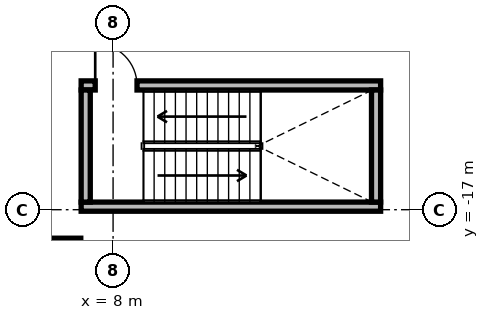
"""IFC4 building model, lengths in metres.
Left out: names, types, materials, properties, quantities, classifications, styles, units other than length and angle.
Written with IfcOpenShell. Run it as: python <this file> out.ifc"""

import sys

from ifc_helpers import new_model, si_unit, direction, frame, frame_2d, origin, origin_2d, place, context, subcontext, project, spatial, rectangle, extrude, source, transform, mapped, element, fill, save


model = new_model("IFC4")
c1 = context("Model", 3, precision=1e-05, world=origin(), true_north=direction((0.0, 1.0)))
c2 = subcontext(c1, "Body", "Model", "MODEL_VIEW")
j1 = project(units=[si_unit("LENGTHUNIT", "METRE"), si_unit("PLANEANGLEUNIT", "RADIAN")], contexts=[c1])
p1 = place(None, origin())
s1 = spatial("IfcSite", under=j1, at=p1, CompositionType="ELEMENT")
p2 = place(p1, origin())
s2 = spatial("IfcBuilding", under=s1, at=p2, CompositionType="ELEMENT")
p3 = place(p2, frame((0.0, 0.0, -4.2)))
s3 = spatial("IfcBuildingStorey", under=s2, at=p3, CompositionType="ELEMENT", Elevation=-4.2)
m1 = source(origin(), c2, "Body", "SweptSolid", [
    extrude(rectangle(XDim=1.3, YDim=1.3, at=origin_2d()), origin(), (0.0, 0.0, 1.0), 4.2),
])
p4 = place(p3, frame((6.5, -18.4, 0.0), z_axis=(0.0, 0.0, 1.0), x_axis=(1.0, 0.0, 0.0)))
e1 = element("IfcColumn", 1, at=p4, inside=s3, PredefinedType="COLUMN", context=c2, shape_type="MappedRepresentation", body=[
    mapped(m1, transform((0.0, 0.0, 0.0), x_axis=(1.0, 0.0, 0.0), y_axis=(0.0, 1.0, 0.0), z_axis=(0.0, 0.0, 1.0), scale=1.0)),
])
m2 = source(origin(), c2, "Body", "SweptSolid", [
    extrude(rectangle(XDim=7.88, YDim=0.24, at=frame_2d((3.94, 0.0))), origin(), (0.0, 0.0, 1.0), 3.88),
])
p5 = place(p3, frame((7.16, -13.73, 0.0), z_axis=(0.0, 0.0, 1.0), x_axis=(1.0, 0.0, 0.0)))
e2 = element("IfcWall", 2, at=p5, inside=s3, PredefinedType="PARTITIONING", context=c2, shape_type="MappedRepresentation", body=[
    mapped(m2, transform((0.0, 0.0, 0.0), x_axis=(1.0, 0.0, 0.0), y_axis=(0.0, 1.0, 0.0), z_axis=(0.0, 0.0, 1.0), scale=1.0)),
])
p6 = place(p5, frame((0.37, 0.0, 0.0)))
e3 = element("IfcOpeningElement", 3, at=p6, cuts=e2, PredefinedType="OPENING", context=c2, shape_type="SweptSolid", body=[
    extrude(rectangle(XDim=1.1, YDim=2.15, at=frame_2d((0.55, 1.075))), frame((0.0, 0.13, 0.0), z_axis=(0.0, -1.0, 0.0), x_axis=(1.0, 0.0, 0.0)), (0.0, 0.0, 1.0), 0.26),
])
p7 = place(p3, frame((7.16, -16.92, 0.0), z_axis=(0.0, 0.0, 1.0), x_axis=(1.0, 0.0, 0.0)))
e4 = element("IfcWall", 4, at=p7, inside=s3, PredefinedType="PARTITIONING", context=c2, shape_type="MappedRepresentation", body=[
    mapped(m2, transform((0.0, 0.0, 0.0), x_axis=(1.0, 0.0, 0.0), y_axis=(0.0, 1.0, 0.0), z_axis=(0.0, 0.0, 1.0), scale=1.0)),
])
m3 = source(origin(), c2, "Body", "SweptSolid", [
    extrude(rectangle(XDim=2.95, YDim=0.24, at=frame_2d((1.475, 0.0))), origin(), (0.0, 0.0, 1.0), 3.88),
])
for number, where, z_axis, x_axis in (
    (5, (7.28, -16.8, 0.0), (0.0, 0.0, 1.0), (0.0, 1.0, 0.0)),
    (6, (14.92, -16.8, 0.0), (0.0, 0.0, 1.0), (0.0, 1.0, 0.0)),
):
    element("IfcWall", number, at=place(p3, frame(where, z_axis=z_axis, x_axis=x_axis)), inside=s3, PredefinedType="PARTITIONING", context=c2, shape_type="MappedRepresentation", body=[
        mapped(m3, transform((0.0, 0.0, 0.0), x_axis=(1.0, 0.0, 0.0), y_axis=(0.0, 1.0, 0.0), z_axis=(0.0, 0.0, 1.0), scale=1.0)),
    ])
m4 = source(origin(), c2, "Body", "SweptSolid", [
    extrude(rectangle(XDim=1.1, YDim=2.15, at=frame_2d((0.55, 1.075))), frame((0.0, 0.025, 0.0), z_axis=(0.0, -1.0, 0.0), x_axis=(1.0, 0.0, 0.0)), (0.0, 0.0, 1.0), 0.05),
])
p8 = place(p6, origin())
e7 = element("IfcDoor", 7, at=p8, inside=s3, OperationType="SINGLE_SWING_LEFT", PredefinedType="DOOR", context=c2, shape_type="MappedRepresentation", body=[
    mapped(m4, transform((0.0, 0.0, 0.0), x_axis=(1.0, 0.0, 0.0), y_axis=(0.0, 1.0, 0.0), z_axis=(0.0, 0.0, 1.0), scale=1.0)),
])
fill(e3, e7)
save(model, sys.argv[1])
